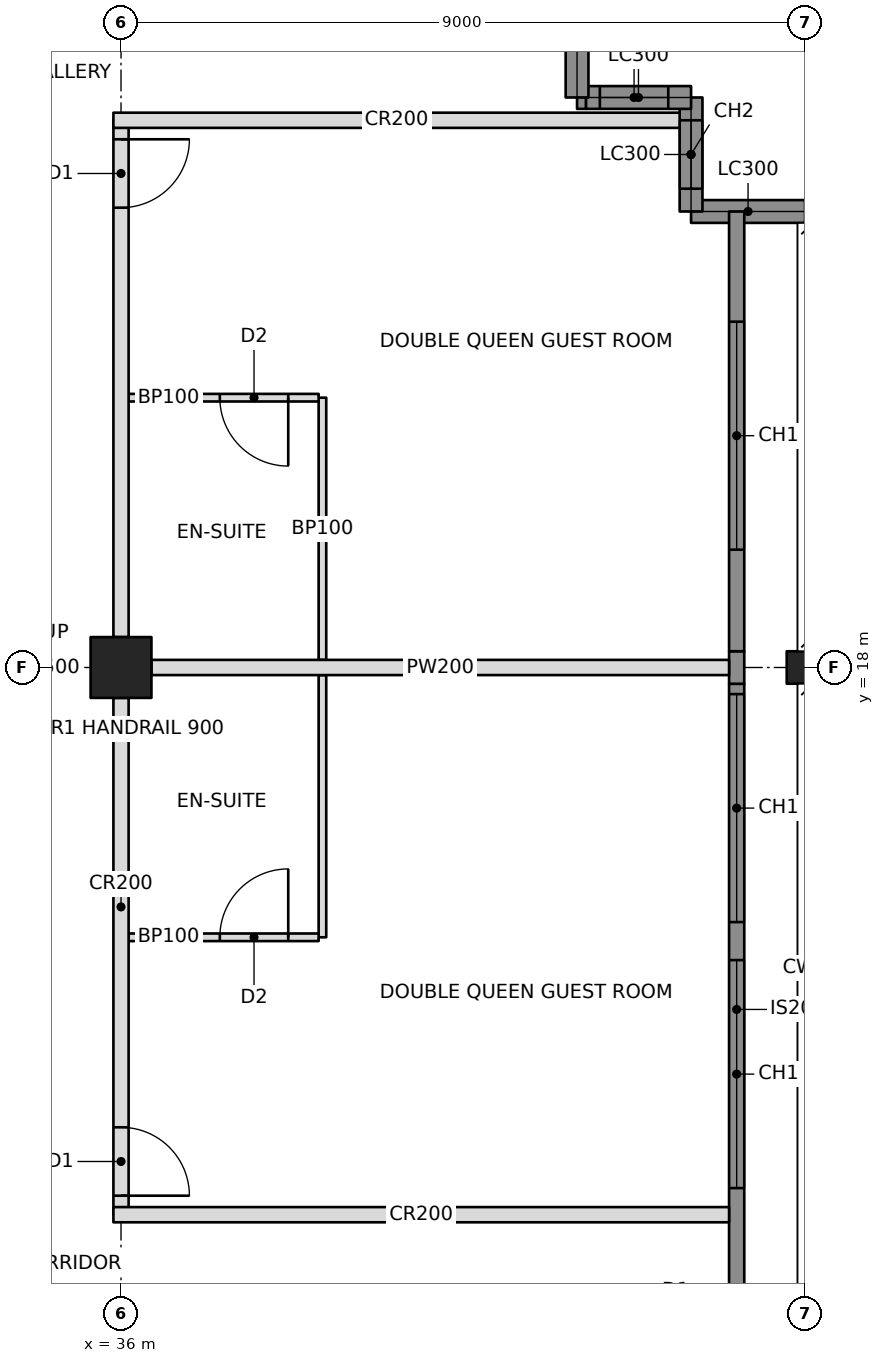
"""IFC4 building model, lengths in metres.
Left out: names, types, materials, properties, quantities, classifications, styles, units other than length and angle.
Written with IfcOpenShell. Run it as: python <this file> out.ifc"""

import sys

from ifc_helpers import new_model, si_unit, direction, frame, frame_2d, origin, origin_2d, place, context, subcontext, project, spatial, rectangle, hollow_rectangle, i_section, extrude, element, fill, save


model = new_model("IFC4")
c1 = context("Model", 3, precision=1e-05, world=origin(), true_north=direction((0.0, 1.0)))
c2 = subcontext(c1, "Body", "Model", "MODEL_VIEW")
j1 = project(units=[si_unit("LENGTHUNIT", "METRE"), si_unit("PLANEANGLEUNIT", "RADIAN")], contexts=[c1])
p1 = place(None, origin())
s1 = spatial("IfcSite", under=j1, at=p1, CompositionType="ELEMENT")
p2 = place(p1, origin())
s2 = spatial("IfcBuilding", under=s1, at=p2, CompositionType="ELEMENT")
p3 = place(p2, frame((0.0, 0.0, 218.2)))
s3 = spatial("IfcBuildingStorey", under=s2, at=p3, CompositionType="ELEMENT", Elevation=218.2)
p4 = place(p3, frame((36.0, 18.0, 0.0), z_axis=(0.0, 0.0, 1.0), x_axis=(0.0, 1.0, 0.0)))
e1 = element("IfcColumn", 1, at=p4, inside=s3, PredefinedType="COLUMN", context=c2, shape_type="SweptSolid", body=[
    extrude(hollow_rectangle(XDim=0.8, YDim=0.8, WallThickness=0.1, at=origin_2d()), origin(), (0.0, 0.0, 1.0), 3.4),
])
p5 = place(p3, frame((45.0, 18.0, 0.0), z_axis=(0.0, 0.0, 1.0), x_axis=(0.0, 1.0, 0.0)))
e2 = element("IfcColumn", 2, at=p5, inside=s3, PredefinedType="COLUMN", context=c2, shape_type="SweptSolid", body=[
    extrude(i_section(OverallWidth=0.427, OverallDepth=0.483, WebThickness=0.051, FlangeThickness=0.082, at=origin_2d()), origin(), (0.0, 0.0, 1.0), 3.4),
])
p6 = place(p3, frame((45.0, 24.0, 0.0), z_axis=(0.0, 0.0, 1.0), x_axis=(-1.0, 0.0, 0.0)))
e3 = element("IfcWall", 3, at=p6, inside=s3, PredefinedType="SOLIDWALL", context=c2, shape_type="SweptSolid", body=[
    extrude(rectangle(XDim=1.5, YDim=0.3, at=frame_2d((0.75, 0.0))), origin(), (0.0, 0.0, 1.0), 2.202),
])
p7 = place(p3, frame((43.5, 24.0, 0.0), z_axis=(0.0, 0.0, 1.0), x_axis=(0.0, 1.0, 0.0)))
e4 = element("IfcWall", 4, at=p7, inside=s3, PredefinedType="SOLIDWALL", context=c2, shape_type="SweptSolid", body=[
    extrude(rectangle(XDim=1.5, YDim=0.3, at=frame_2d((0.75, 0.0))), origin(), (0.0, 0.0, 1.0), 3.15),
])
p8 = place(p7, frame((0.3, 0.0, 0.6)))
e5 = element("IfcOpeningElement", 5, at=p8, cuts=e4, PredefinedType="OPENING", context=c2, shape_type="SweptSolid", body=[
    extrude(rectangle(XDim=0.9, YDim=2.2, at=frame_2d((0.45, 1.1))), frame((0.0, 0.16, 0.0), z_axis=(0.0, -1.0, 0.0), x_axis=(1.0, 0.0, 0.0)), (0.0, 0.0, 1.0), 0.32),
])
p9 = place(p3, frame((43.5, 25.5, 0.0), z_axis=(0.0, 0.0, 1.0), x_axis=(-1.0, 0.0, 0.0)))
e6 = element("IfcWall", 6, at=p9, inside=s3, PredefinedType="SOLIDWALL", context=c2, shape_type="SweptSolid", body=[
    extrude(rectangle(XDim=1.384, YDim=0.3, at=frame_2d((0.692, 0.0))), origin(), (0.0, 0.0, 1.0), 3.15),
])
p10 = place(p9, frame((0.3, 0.0, 0.6)))
e7 = element("IfcOpeningElement", 7, at=p10, cuts=e6, PredefinedType="OPENING", context=c2, shape_type="SweptSolid", body=[
    extrude(rectangle(XDim=0.9, YDim=2.2, at=frame_2d((0.45, 1.1))), frame((0.0, 0.16, 0.0), z_axis=(0.0, -1.0, 0.0), x_axis=(1.0, 0.0, 0.0)), (0.0, 0.0, 1.0), 0.32),
])
p11 = place(p3, frame((42.0, 25.5, 0.0), z_axis=(0.0, 0.0, 1.0), x_axis=(0.0, 1.0, 0.0)))
e8 = element("IfcWall", 8, at=p11, inside=s3, PredefinedType="SOLIDWALL", context=c2, shape_type="SweptSolid", body=[
    extrude(rectangle(XDim=1.5, YDim=0.3, at=frame_2d((0.75, 0.0))), origin(), (0.0, 0.0, 1.0), 2.202),
])
p12 = place(p3, frame((36.0, 10.8, 0.0), z_axis=(0.0, 0.0, 1.0), x_axis=(0.0, 1.0, 0.0)))
e9 = element("IfcWall", 9, at=p12, inside=s3, PredefinedType="PARTITIONING", context=c2, shape_type="SweptSolid", body=[
    extrude(rectangle(XDim=6.8, YDim=0.2, at=frame_2d((3.4, 0.0))), origin(), (0.0, 0.0, 1.0), 2.21),
])
p13 = place(p12, frame((0.25, 0.0, 0.0)))
e10 = element("IfcOpeningElement", 10, at=p13, cuts=e9, PredefinedType="OPENING", context=c2, shape_type="SweptSolid", body=[
    extrude(rectangle(XDim=0.9, YDim=2.1, at=frame_2d((0.45, 1.05))), frame((0.0, 0.11, 0.0), z_axis=(0.0, -1.0, 0.0), x_axis=(1.0, 0.0, 0.0)), (0.0, 0.0, 1.0), 0.22),
])
p14 = place(p3, frame((36.0, 18.4, 0.0), z_axis=(0.0, 0.0, 1.0), x_axis=(0.0, 1.0, 0.0)))
e11 = element("IfcWall", 11, at=p14, inside=s3, PredefinedType="PARTITIONING", context=c2, shape_type="SweptSolid", body=[
    extrude(rectangle(XDim=6.8, YDim=0.2, at=frame_2d((3.4, 0.0))), origin(), (0.0, 0.0, 1.0), 2.21),
])
p15 = place(p14, frame((5.65, 0.0, 0.0)))
e12 = element("IfcOpeningElement", 12, at=p15, cuts=e11, PredefinedType="OPENING", context=c2, shape_type="SweptSolid", body=[
    extrude(rectangle(XDim=0.9, YDim=2.1, at=frame_2d((0.45, 1.05))), frame((0.0, 0.11, 0.0), z_axis=(0.0, -1.0, 0.0), x_axis=(1.0, 0.0, 0.0)), (0.0, 0.0, 1.0), 0.22),
])
p16 = place(p3, frame((35.9, 10.8, 0.0), z_axis=(0.0, 0.0, 1.0), x_axis=(1.0, 0.0, 0.0)))
e13 = element("IfcWall", 13, at=p16, inside=s3, PredefinedType="PARTITIONING", context=c2, shape_type="SweptSolid", body=[
    extrude(rectangle(XDim=8.1, YDim=0.2, at=frame_2d((4.05, 0.0))), origin(), (0.0, 0.0, 1.0), 2.21),
])
p17 = place(p3, frame((35.9, 25.2, 0.0), z_axis=(0.0, 0.0, 1.0), x_axis=(1.0, 0.0, 0.0)))
e14 = element("IfcWall", 14, at=p17, inside=s3, PredefinedType="PARTITIONING", context=c2, shape_type="SweptSolid", body=[
    extrude(rectangle(XDim=7.45, YDim=0.2, at=frame_2d((3.725, 0.0))), origin(), (0.0, 0.0, 1.0), 2.21),
])
p18 = place(p3, frame((36.4, 18.0, 0.0), z_axis=(0.0, 0.0, 1.0), x_axis=(1.0, 0.0, 0.0)))
e15 = element("IfcWall", 15, at=p18, inside=s3, PredefinedType="PARTITIONING", context=c2, shape_type="SweptSolid", body=[
    extrude(rectangle(XDim=7.6, YDim=0.2, at=frame_2d((3.8, 0.0))), origin(), (0.0, 0.0, 1.0), 2.203),
])
p19 = place(p3, frame((38.65, 14.45, 0.0), z_axis=(0.0, 0.0, 1.0), x_axis=(0.0, 1.0, 0.0)))
e16 = element("IfcWall", 16, at=p19, inside=s3, PredefinedType="PARTITIONING", context=c2, shape_type="SweptSolid", body=[
    extrude(rectangle(XDim=3.45, YDim=0.1, at=frame_2d((1.725, 0.0))), origin(), (0.0, 0.0, 1.0), 2.202),
])
p20 = place(p3, frame((36.1, 14.45, 0.0), z_axis=(0.0, 0.0, 1.0), x_axis=(1.0, 0.0, 0.0)))
e17 = element("IfcWall", 17, at=p20, inside=s3, PredefinedType="PARTITIONING", context=c2, shape_type="SweptSolid", body=[
    extrude(rectangle(XDim=2.5, YDim=0.1, at=frame_2d((1.25, 0.0))), origin(), (0.0, 0.0, 1.0), 2.21),
])
p21 = place(p20, frame((1.2, 0.0, 0.0)))
e18 = element("IfcOpeningElement", 18, at=p21, cuts=e17, PredefinedType="OPENING", context=c2, shape_type="SweptSolid", body=[
    extrude(rectangle(XDim=0.9, YDim=2.1, at=frame_2d((0.45, 1.05))), frame((0.0, 0.06, 0.0), z_axis=(0.0, -1.0, 0.0), x_axis=(1.0, 0.0, 0.0)), (0.0, 0.0, 1.0), 0.12),
])
p22 = place(p3, frame((38.65, 18.1, 0.0), z_axis=(0.0, 0.0, 1.0), x_axis=(0.0, 1.0, 0.0)))
e19 = element("IfcWall", 19, at=p22, inside=s3, PredefinedType="PARTITIONING", context=c2, shape_type="SweptSolid", body=[
    extrude(rectangle(XDim=3.45, YDim=0.1, at=frame_2d((1.725, 0.0))), origin(), (0.0, 0.0, 1.0), 2.202),
])
p23 = place(p3, frame((36.1, 21.55, 0.0), z_axis=(0.0, 0.0, 1.0), x_axis=(1.0, 0.0, 0.0)))
e20 = element("IfcWall", 20, at=p23, inside=s3, PredefinedType="PARTITIONING", context=c2, shape_type="SweptSolid", body=[
    extrude(rectangle(XDim=2.5, YDim=0.1, at=frame_2d((1.25, 0.0))), origin(), (0.0, 0.0, 1.0), 2.21),
])
p24 = place(p23, frame((1.2, 0.0, 0.0)))
e21 = element("IfcOpeningElement", 21, at=p24, cuts=e20, PredefinedType="OPENING", context=c2, shape_type="SweptSolid", body=[
    extrude(rectangle(XDim=0.9, YDim=2.1, at=frame_2d((0.45, 1.05))), frame((0.0, 0.06, 0.0), z_axis=(0.0, -1.0, 0.0), x_axis=(1.0, 0.0, 0.0)), (0.0, 0.0, 1.0), 0.12),
])
p25 = place(p3, frame((42.116, 25.5, 0.0), z_axis=(0.0, 0.0, 1.0), x_axis=(-1.0, 0.0, 0.0)))
e22 = element("IfcWall", 22, at=p25, inside=s3, PredefinedType="SOLIDWALL", context=c2, shape_type="SweptSolid", body=[
    extrude(rectangle(XDim=0.116, YDim=0.3, at=frame_2d((0.058, 0.0))), origin(), (0.0, 0.0, 1.0), 2.542),
])
p26 = place(p3, frame((44.1, 9.215, 0.0), z_axis=(0.0, 0.0, 1.0), x_axis=(0.0, 1.0, 0.0)))
e23 = element("IfcWall", 23, at=p26, inside=s3, PredefinedType="SOLIDWALL", context=c2, shape_type="SweptSolid", body=[
    extrude(rectangle(XDim=8.571, YDim=0.2, at=frame_2d((4.285, 0.0))), origin(), (0.0, 0.0, 1.0), 3.15),
])
p27 = place(p26, frame((1.935, 0.0, 0.6)))
e24 = element("IfcOpeningElement", 24, at=p27, cuts=e23, PredefinedType="OPENING", context=c2, shape_type="SweptSolid", body=[
    extrude(rectangle(XDim=3.0, YDim=2.2, at=frame_2d((1.5, 1.1))), frame((0.0, 0.11, 0.0), z_axis=(0.0, -1.0, 0.0), x_axis=(1.0, 0.0, 0.0)), (0.0, 0.0, 1.0), 0.22),
])
p28 = place(p26, frame((5.435, 0.0, 0.6)))
e25 = element("IfcOpeningElement", 25, at=p28, cuts=e23, PredefinedType="OPENING", context=c2, shape_type="SweptSolid", body=[
    extrude(rectangle(XDim=3.0, YDim=2.2, at=frame_2d((1.5, 1.1))), frame((0.0, 0.11, 0.0), z_axis=(0.0, -1.0, 0.0), x_axis=(1.0, 0.0, 0.0)), (0.0, 0.0, 1.0), 0.22),
])
p29 = place(p3, frame((44.1, 17.786, 0.0), z_axis=(0.0, 0.0, 1.0), x_axis=(0.0, 1.0, 0.0)))
e26 = element("IfcWall", 26, at=p29, inside=s3, PredefinedType="SOLIDWALL", context=c2, shape_type="SweptSolid", body=[
    extrude(rectangle(XDim=0.428, YDim=0.2, at=frame_2d((0.214, 0.0))), origin(), (0.0, 0.0, 1.0), 2.202),
])
p30 = place(p3, frame((44.1, 18.214, 0.0), z_axis=(0.0, 0.0, 1.0), x_axis=(0.0, 1.0, 0.0)))
e27 = element("IfcWall", 27, at=p30, inside=s3, PredefinedType="SOLIDWALL", context=c2, shape_type="SweptSolid", body=[
    extrude(rectangle(XDim=5.786, YDim=0.2, at=frame_2d((2.893, 0.0))), origin(), (0.0, 0.0, 1.0), 3.15),
])
p31 = place(p30, frame((1.336, 0.0, 0.6)))
e28 = element("IfcOpeningElement", 28, at=p31, cuts=e27, PredefinedType="OPENING", context=c2, shape_type="SweptSolid", body=[
    extrude(rectangle(XDim=3.0, YDim=2.2, at=frame_2d((1.5, 1.1))), frame((0.0, 0.11, 0.0), z_axis=(0.0, -1.0, 0.0), x_axis=(1.0, 0.0, 0.0)), (0.0, 0.0, 1.0), 0.22),
])
p32 = place(p8, origin())
e29 = element("IfcWindow", 29, at=p32, inside=s3, PartitioningType="SINGLE_PANEL", PredefinedType="WINDOW", context=c2, shape_type="SweptSolid", body=[
    extrude(rectangle(XDim=0.9, YDim=2.2, at=frame_2d((0.45, 1.1))), frame((0.0, 0.03, 0.0), z_axis=(0.0, -1.0, 0.0), x_axis=(1.0, 0.0, 0.0)), (0.0, 0.0, 1.0), 0.06),
])
fill(e5, e29)
p33 = place(p10, origin())
e30 = element("IfcWindow", 30, at=p33, inside=s3, PartitioningType="SINGLE_PANEL", PredefinedType="WINDOW", context=c2, shape_type="SweptSolid", body=[
    extrude(rectangle(XDim=0.9, YDim=2.2, at=frame_2d((0.45, 1.1))), frame((0.0, 0.03, 0.0), z_axis=(0.0, -1.0, 0.0), x_axis=(1.0, 0.0, 0.0)), (0.0, 0.0, 1.0), 0.06),
])
fill(e7, e30)
p34 = place(p27, origin())
e31 = element("IfcWindow", 31, at=p34, inside=s3, PartitioningType="TRIPLE_PANEL_VERTICAL", PredefinedType="WINDOW", context=c2, shape_type="SweptSolid", body=[
    extrude(rectangle(XDim=3.0, YDim=2.2, at=frame_2d((1.5, 1.1))), frame((0.0, 0.03, 0.0), z_axis=(0.0, -1.0, 0.0), x_axis=(1.0, 0.0, 0.0)), (0.0, 0.0, 1.0), 0.06),
])
fill(e24, e31)
p35 = place(p28, origin())
e32 = element("IfcWindow", 32, at=p35, inside=s3, PartitioningType="TRIPLE_PANEL_VERTICAL", PredefinedType="WINDOW", context=c2, shape_type="SweptSolid", body=[
    extrude(rectangle(XDim=3.0, YDim=2.2, at=frame_2d((1.5, 1.1))), frame((0.0, 0.03, 0.0), z_axis=(0.0, -1.0, 0.0), x_axis=(1.0, 0.0, 0.0)), (0.0, 0.0, 1.0), 0.06),
])
fill(e25, e32)
p36 = place(p31, origin())
e33 = element("IfcWindow", 33, at=p36, inside=s3, PartitioningType="TRIPLE_PANEL_VERTICAL", PredefinedType="WINDOW", context=c2, shape_type="SweptSolid", body=[
    extrude(rectangle(XDim=3.0, YDim=2.2, at=frame_2d((1.5, 1.1))), frame((0.0, 0.03, 0.0), z_axis=(0.0, -1.0, 0.0), x_axis=(1.0, 0.0, 0.0)), (0.0, 0.0, 1.0), 0.06),
])
fill(e28, e33)
p37 = place(p21, origin())
e34 = element("IfcDoor", 34, at=p37, inside=s3, OperationType="SINGLE_SWING_RIGHT", PredefinedType="DOOR", context=c2, shape_type="SweptSolid", body=[
    extrude(rectangle(XDim=0.9, YDim=2.1, at=frame_2d((0.45, 1.05))), frame((0.0, 0.025, 0.0), z_axis=(0.0, -1.0, 0.0), x_axis=(1.0, 0.0, 0.0)), (0.0, 0.0, 1.0), 0.05),
])
fill(e18, e34)
p38 = place(p13, frame((0.9, 0.0, 0.0), z_axis=(0.0, 0.0, 1.0), x_axis=(-1.0, 0.0, 0.0)))
e35 = element("IfcDoor", 35, at=p38, inside=s3, OperationType="SINGLE_SWING_RIGHT", PredefinedType="DOOR", context=c2, shape_type="SweptSolid", body=[
    extrude(rectangle(XDim=0.9, YDim=2.1, at=frame_2d((0.45, 1.05))), frame((0.0, 0.025, 0.0), z_axis=(0.0, -1.0, 0.0), x_axis=(1.0, 0.0, 0.0)), (0.0, 0.0, 1.0), 0.05),
])
fill(e10, e35)
p39 = place(p24, frame((0.9, 0.0, 0.0), z_axis=(0.0, 0.0, 1.0), x_axis=(-1.0, 0.0, 0.0)))
e36 = element("IfcDoor", 36, at=p39, inside=s3, OperationType="SINGLE_SWING_LEFT", PredefinedType="DOOR", context=c2, shape_type="SweptSolid", body=[
    extrude(rectangle(XDim=0.9, YDim=2.1, at=frame_2d((0.45, 1.05))), frame((0.0, 0.025, 0.0), z_axis=(0.0, -1.0, 0.0), x_axis=(1.0, 0.0, 0.0)), (0.0, 0.0, 1.0), 0.05),
])
fill(e21, e36)
p40 = place(p15, frame((0.9, 0.0, 0.0), z_axis=(0.0, 0.0, 1.0), x_axis=(-1.0, 0.0, 0.0)))
e37 = element("IfcDoor", 37, at=p40, inside=s3, OperationType="SINGLE_SWING_LEFT", PredefinedType="DOOR", context=c2, shape_type="SweptSolid", body=[
    extrude(rectangle(XDim=0.9, YDim=2.1, at=frame_2d((0.45, 1.05))), frame((0.0, 0.025, 0.0), z_axis=(0.0, -1.0, 0.0), x_axis=(1.0, 0.0, 0.0)), (0.0, 0.0, 1.0), 0.05),
])
fill(e12, e37)
save(model, sys.argv[1])
